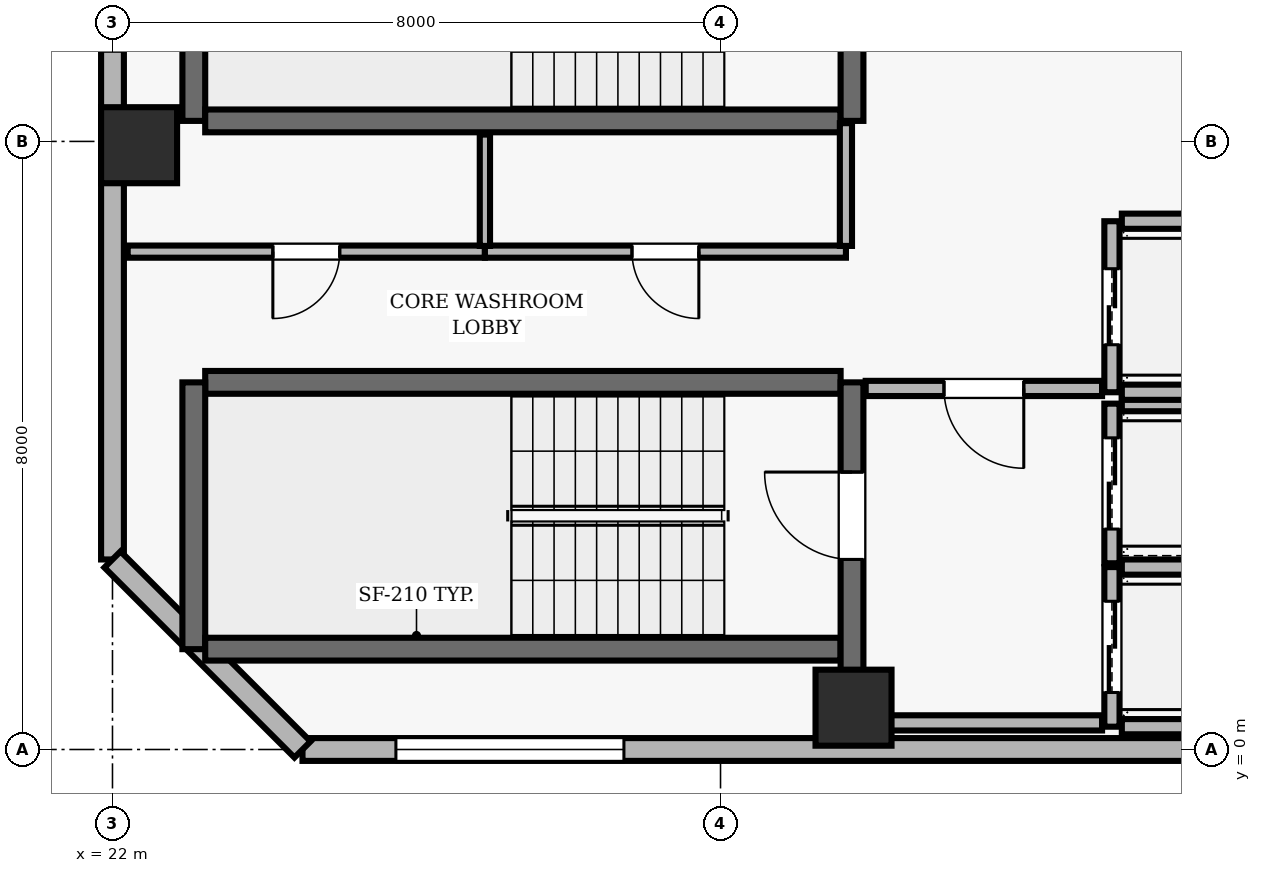
"""IFC4 building model, lengths in metres.
Left out: names, types, materials, properties, quantities, classifications, styles, units other than length and angle.
Written with IfcOpenShell. Run it as: python <this file> out.ifc"""

import sys

from ifc_helpers import new_model, si_unit, direction, frame, frame_2d, origin, origin_2d, place, context, subcontext, project, spatial, rectangle, extrude, element, fill, save


model = new_model("IFC4")
c1 = context("Model", 3, precision=1e-05, world=origin(), true_north=direction((0.0, 1.0)))
c2 = subcontext(c1, "Body", "Model", "MODEL_VIEW")
j1 = project(units=[si_unit("LENGTHUNIT", "METRE"), si_unit("PLANEANGLEUNIT", "RADIAN")], contexts=[c1])
p1 = place(None, origin())
s1 = spatial("IfcSite", under=j1, at=p1, CompositionType="ELEMENT")
p2 = place(p1, origin())
s2 = spatial("IfcBuilding", under=s1, at=p2, CompositionType="ELEMENT")
p3 = place(p2, frame((0.0, 0.0, 195.3)))
s3 = spatial("IfcBuildingStorey", under=s2, at=p3, CompositionType="ELEMENT", Elevation=195.3)
for number, where, z_axis, x_axis in (
    (1, (31.75, 0.55, 0.0), (0.0, 0.0, 1.0), (1.0, 0.0, 0.0)),
    (2, (22.35, 7.95, 0.0), (0.0, 0.0, 1.0), (1.0, 0.0, 0.0)),
):
    element("IfcColumn", number, at=place(p3, frame(where, z_axis=z_axis, x_axis=x_axis)), inside=s3, PredefinedType="COLUMN", context=c2, shape_type="SweptSolid", body=[
        extrude(rectangle(XDim=1.0, YDim=1.0, at=origin_2d()), origin(), (0.0, 0.0, 1.0), 3.9),
    ])
p4 = place(p3, frame((24.5, 0.0, 0.0), z_axis=(0.0, 0.0, 1.0), x_axis=(1.0, 0.0, 0.0)))
e3 = element("IfcWall", 3, at=p4, inside=s3, PredefinedType="SOLIDWALL", context=c2, shape_type="SweptSolid", body=[
    extrude(rectangle(XDim=38.2, YDim=0.3, at=frame_2d((19.1, 0.0))), origin(), (0.0, 0.0, 1.0), 3.69),
])
p5 = place(p4, frame((1.229, 0.0, 0.9)))
e4 = element("IfcOpeningElement", 4, at=p5, cuts=e3, PredefinedType="OPENING", context=c2, shape_type="SweptSolid", body=[
    extrude(rectangle(XDim=3.0, YDim=2.2, at=frame_2d((1.5, 1.1))), frame((0.0, 0.16, 0.0), z_axis=(0.0, -1.0, 0.0), x_axis=(1.0, 0.0, 0.0)), (0.0, 0.0, 1.0), 0.32),
])
p6 = place(p4, frame((17.6, 0.0, 0.9)))
e5 = element("IfcOpeningElement", 5, at=p6, cuts=e3, PredefinedType="OPENING", context=c2, shape_type="SweptSolid", body=[
    extrude(rectangle(XDim=3.0, YDim=2.2, at=frame_2d((1.5, 1.1))), frame((0.0, 0.16, 0.0), z_axis=(0.0, -1.0, 0.0), x_axis=(1.0, 0.0, 0.0)), (0.0, 0.0, 1.0), 0.32),
])
p7 = place(p4, frame((23.057, 0.0, 0.9)))
e6 = element("IfcOpeningElement", 6, at=p7, cuts=e3, PredefinedType="OPENING", context=c2, shape_type="SweptSolid", body=[
    extrude(rectangle(XDim=3.0, YDim=2.2, at=frame_2d((1.5, 1.1))), frame((0.0, 0.16, 0.0), z_axis=(0.0, -1.0, 0.0), x_axis=(1.0, 0.0, 0.0)), (0.0, 0.0, 1.0), 0.32),
])
p8 = place(p4, frame((29.414, 0.0, 0.9)))
e7 = element("IfcOpeningElement", 7, at=p8, cuts=e3, PredefinedType="OPENING", context=c2, shape_type="SweptSolid", body=[
    extrude(rectangle(XDim=3.0, YDim=2.2, at=frame_2d((1.5, 1.1))), frame((0.0, 0.16, 0.0), z_axis=(0.0, -1.0, 0.0), x_axis=(1.0, 0.0, 0.0)), (0.0, 0.0, 1.0), 0.32),
])
p9 = place(p3, frame((22.0, 40.7, 0.0), z_axis=(0.0, 0.0, 1.0), x_axis=(0.0, -1.0, 0.0)))
e8 = element("IfcWall", 8, at=p9, inside=s3, PredefinedType="SOLIDWALL", context=c2, shape_type="SweptSolid", body=[
    extrude(rectangle(XDim=38.2, YDim=0.3, at=frame_2d((19.1, 0.0))), origin(), (0.0, 0.0, 1.0), 3.69),
])
p10 = place(p9, frame((7.8, 0.0, 0.0)))
e9 = element("IfcOpeningElement", 9, at=p10, cuts=e8, PredefinedType="OPENING", context=c2, shape_type="SweptSolid", body=[
    extrude(rectangle(XDim=1.0, YDim=2.2, at=frame_2d((0.5, 1.1))), frame((0.0, 0.16, 0.0), z_axis=(0.0, -1.0, 0.0), x_axis=(1.0, 0.0, 0.0)), (0.0, 0.0, 1.0), 0.32),
])
p11 = place(p9, frame((1.229, 0.0, 0.9)))
e10 = element("IfcOpeningElement", 10, at=p11, cuts=e8, PredefinedType="OPENING", context=c2, shape_type="SweptSolid", body=[
    extrude(rectangle(XDim=3.0, YDim=2.2, at=frame_2d((1.5, 1.1))), frame((0.0, 0.16, 0.0), z_axis=(0.0, -1.0, 0.0), x_axis=(1.0, 0.0, 0.0)), (0.0, 0.0, 1.0), 0.32),
])
p12 = place(p9, frame((18.05, 0.0, 0.9)))
e11 = element("IfcOpeningElement", 11, at=p12, cuts=e8, PredefinedType="OPENING", context=c2, shape_type="SweptSolid", body=[
    extrude(rectangle(XDim=3.0, YDim=2.2, at=frame_2d((1.5, 1.1))), frame((0.0, 0.16, 0.0), z_axis=(0.0, -1.0, 0.0), x_axis=(1.0, 0.0, 0.0)), (0.0, 0.0, 1.0), 0.32),
])
p13 = place(p9, frame((28.514, 0.0, 0.9)))
e12 = element("IfcOpeningElement", 12, at=p13, cuts=e8, PredefinedType="OPENING", context=c2, shape_type="SweptSolid", body=[
    extrude(rectangle(XDim=3.0, YDim=2.2, at=frame_2d((1.5, 1.1))), frame((0.0, 0.16, 0.0), z_axis=(0.0, -1.0, 0.0), x_axis=(1.0, 0.0, 0.0)), (0.0, 0.0, 1.0), 0.32),
])
p14 = place(p3, frame((22.0, 2.5, 0.0), z_axis=(0.0, 0.0, 1.0), x_axis=(0.707106781187, -0.707106781187, 0.0)))
e13 = element("IfcWall", 13, at=p14, inside=s3, PredefinedType="SOLIDWALL", context=c2, shape_type="SweptSolid", body=[
    extrude(rectangle(XDim=3.536, YDim=0.3, at=frame_2d((1.768, 0.0))), origin(), (0.0, 0.0, 1.0), 3.69),
])
p15 = place(p3, frame((31.58, 4.83, 0.0), z_axis=(0.0, 0.0, 1.0), x_axis=(-1.0, 0.0, 0.0)))
e14 = element("IfcWall", 14, at=p15, inside=s3, PredefinedType="SHEAR", context=c2, shape_type="SweptSolid", body=[
    extrude(rectangle(XDim=8.36, YDim=0.3, at=frame_2d((4.18, 0.0))), origin(), (0.0, 0.0, 1.0), 3.69),
])
p16 = place(p3, frame((23.07, 4.83, 0.0), z_axis=(0.0, 0.0, 1.0), x_axis=(0.0, -1.0, 0.0)))
e15 = element("IfcWall", 15, at=p16, inside=s3, PredefinedType="SHEAR", context=c2, shape_type="SweptSolid", body=[
    extrude(rectangle(XDim=3.51, YDim=0.3, at=frame_2d((1.755, 0.0))), origin(), (0.0, 0.0, 1.0), 3.69),
])
p17 = place(p3, frame((23.22, 1.32, 0.0), z_axis=(0.0, 0.0, 1.0), x_axis=(1.0, 0.0, 0.0)))
e16 = element("IfcWall", 16, at=p17, inside=s3, PredefinedType="SHEAR", context=c2, shape_type="SweptSolid", body=[
    extrude(rectangle(XDim=8.36, YDim=0.3, at=frame_2d((4.18, 0.0))), origin(), (0.0, 0.0, 1.0), 3.69),
])
p18 = place(p3, frame((31.73, 0.96, 0.0), z_axis=(0.0, 0.0, 1.0), x_axis=(0.0, 1.0, 0.0)))
e17 = element("IfcWall", 17, at=p18, inside=s3, PredefinedType="SHEAR", context=c2, shape_type="SweptSolid", body=[
    extrude(rectangle(XDim=3.87, YDim=0.3, at=frame_2d((1.935, 0.0))), origin(), (0.0, 0.0, 1.0), 3.69),
])
p19 = place(p18, frame((1.54, 0.0, 0.0)))
e18 = element("IfcOpeningElement", 18, at=p19, cuts=e17, PredefinedType="OPENING", context=c2, shape_type="SweptSolid", body=[
    extrude(rectangle(XDim=1.15, YDim=2.15, at=frame_2d((0.575, 1.075))), frame((0.0, 0.16, 0.0), z_axis=(0.0, -1.0, 0.0), x_axis=(1.0, 0.0, 0.0)), (0.0, 0.0, 1.0), 0.32),
])
p20 = place(p3, frame((23.07, 11.78, 0.0), z_axis=(0.0, 0.0, 1.0), x_axis=(0.0, -1.0, 0.0)))
e19 = element("IfcWall", 19, at=p20, inside=s3, PredefinedType="SHEAR", context=c2, shape_type="SweptSolid", body=[
    extrude(rectangle(XDim=3.51, YDim=0.3, at=frame_2d((1.755, 0.0))), origin(), (0.0, 0.0, 1.0), 3.69),
])
p21 = place(p3, frame((23.22, 8.27, 0.0), z_axis=(0.0, 0.0, 1.0), x_axis=(1.0, 0.0, 0.0)))
e20 = element("IfcWall", 20, at=p21, inside=s3, PredefinedType="SHEAR", context=c2, shape_type="SweptSolid", body=[
    extrude(rectangle(XDim=8.36, YDim=0.3, at=frame_2d((4.18, 0.0))), origin(), (0.0, 0.0, 1.0), 3.69),
])
p22 = place(p3, frame((31.73, 8.27, 0.0), z_axis=(0.0, 0.0, 1.0), x_axis=(0.0, 1.0, 0.0)))
e21 = element("IfcWall", 21, at=p22, inside=s3, PredefinedType="SHEAR", context=c2, shape_type="SweptSolid", body=[
    extrude(rectangle(XDim=3.51, YDim=0.3, at=frame_2d((1.755, 0.0))), origin(), (0.0, 0.0, 1.0), 3.69),
])
p23 = place(p22, frame((1.18, 0.0, 0.0)))
e22 = element("IfcOpeningElement", 22, at=p23, cuts=e21, PredefinedType="OPENING", context=c2, shape_type="SweptSolid", body=[
    extrude(rectangle(XDim=1.15, YDim=2.15, at=frame_2d((0.575, 1.075))), frame((0.0, 0.16, 0.0), z_axis=(0.0, -1.0, 0.0), x_axis=(1.0, 0.0, 0.0)), (0.0, 0.0, 1.0), 0.32),
])
p24 = place(p3, frame((35.15, 2.4, 0.0), z_axis=(0.0, 0.0, 1.0), x_axis=(0.0, -1.0, 0.0)))
e23 = element("IfcWall", 23, at=p24, inside=s3, PredefinedType="SOLIDWALL", context=c2, shape_type="SweptSolid", body=[
    extrude(rectangle(XDim=2.1, YDim=0.2, at=frame_2d((1.05, 0.0))), origin(), (0.0, 0.0, 1.0), 3.69),
])
p25 = place(p24, frame((0.45, 0.0, 0.0)))
e24 = element("IfcOpeningElement", 24, at=p25, cuts=e23, PredefinedType="OPENING", context=c2, shape_type="SweptSolid", body=[
    extrude(rectangle(XDim=1.2, YDim=2.15, at=frame_2d((0.6, 1.075))), frame((0.0, 0.11, 0.0), z_axis=(0.0, -1.0, 0.0), x_axis=(1.0, 0.0, 0.0)), (0.0, 0.0, 1.0), 0.22),
])
for number, where, z_axis, x_axis in (
    (25, (35.28, 0.3, 0.0), (0.0, 0.0, 1.0), (1.0, 0.0, 0.0)),
    (26, (37.42, 2.4, 0.0), (0.0, 0.0, 1.0), (-1.0, 0.0, 0.0)),
):
    element("IfcWall", number, at=place(p3, frame(where, z_axis=z_axis, x_axis=x_axis)), inside=s3, PredefinedType="SOLIDWALL", context=c2, shape_type="SweptSolid", body=[
        extrude(rectangle(XDim=2.14, YDim=0.2, at=frame_2d((1.07, 0.0))), origin(), (0.0, 0.0, 1.0), 3.69),
    ])
p26 = place(p3, frame((35.15, 4.55, 0.0), z_axis=(0.0, 0.0, 1.0), x_axis=(0.0, -1.0, 0.0)))
e27 = element("IfcWall", 27, at=p26, inside=s3, PredefinedType="SOLIDWALL", context=c2, shape_type="SweptSolid", body=[
    extrude(rectangle(XDim=2.1, YDim=0.2, at=frame_2d((1.05, 0.0))), origin(), (0.0, 0.0, 1.0), 3.69),
])
p27 = place(p26, frame((0.45, 0.0, 0.0)))
e28 = element("IfcOpeningElement", 28, at=p27, cuts=e27, PredefinedType="OPENING", context=c2, shape_type="SweptSolid", body=[
    extrude(rectangle(XDim=1.2, YDim=2.15, at=frame_2d((0.6, 1.075))), frame((0.0, 0.11, 0.0), z_axis=(0.0, -1.0, 0.0), x_axis=(1.0, 0.0, 0.0)), (0.0, 0.0, 1.0), 0.22),
])
p28 = place(p3, frame((37.42, 4.55, 0.0), z_axis=(0.0, 0.0, 1.0), x_axis=(-1.0, 0.0, 0.0)))
e29 = element("IfcWall", 29, at=p28, inside=s3, PredefinedType="SOLIDWALL", context=c2, shape_type="SweptSolid", body=[
    extrude(rectangle(XDim=2.14, YDim=0.2, at=frame_2d((1.07, 0.0))), origin(), (0.0, 0.0, 1.0), 3.69),
])
p29 = place(p3, frame((35.15, 6.95, 0.0), z_axis=(0.0, 0.0, 1.0), x_axis=(0.0, -1.0, 0.0)))
e30 = element("IfcWall", 30, at=p29, inside=s3, PredefinedType="SOLIDWALL", context=c2, shape_type="SweptSolid", body=[
    extrude(rectangle(XDim=2.25, YDim=0.2, at=frame_2d((1.125, 0.0))), origin(), (0.0, 0.0, 1.0), 3.69),
])
p30 = place(p29, frame((0.625, 0.0, 0.0)))
e31 = element("IfcOpeningElement", 31, at=p30, cuts=e30, PredefinedType="OPENING", context=c2, shape_type="SweptSolid", body=[
    extrude(rectangle(XDim=1.0, YDim=2.1, at=frame_2d((0.5, 1.05))), frame((0.0, 0.11, 0.0), z_axis=(0.0, -1.0, 0.0), x_axis=(1.0, 0.0, 0.0)), (0.0, 0.0, 1.0), 0.22),
])
for number, where, z_axis, x_axis in (
    (32, (35.28, 4.7, 0.0), (0.0, 0.0, 1.0), (1.0, 0.0, 0.0)),
    (33, (37.42, 6.95, 0.0), (0.0, 0.0, 1.0), (-1.0, 0.0, 0.0)),
):
    element("IfcWall", number, at=place(p3, frame(where, z_axis=z_axis, x_axis=x_axis)), inside=s3, PredefinedType="SOLIDWALL", context=c2, shape_type="SweptSolid", body=[
        extrude(rectangle(XDim=2.14, YDim=0.2, at=frame_2d((1.07, 0.0))), origin(), (0.0, 0.0, 1.0), 3.69),
    ])
p31 = place(p3, frame((26.9, 6.55, 0.0), z_axis=(0.0, 0.0, 1.0), x_axis=(-1.0, 0.0, 0.0)))
e34 = element("IfcWall", 34, at=p31, inside=s3, PredefinedType="PARTITIONING", context=c2, shape_type="SweptSolid", body=[
    extrude(rectangle(XDim=4.7, YDim=0.16, at=frame_2d((2.35, 0.0))), origin(), (0.0, 0.0, 1.0), 3.69),
])
p32 = place(p31, frame((1.91, 0.0, 0.0)))
e35 = element("IfcOpeningElement", 35, at=p32, cuts=e34, PredefinedType="OPENING", context=c2, shape_type="SweptSolid", body=[
    extrude(rectangle(XDim=0.88, YDim=2.1, at=frame_2d((0.44, 1.05))), frame((0.0, 0.09, 0.0), z_axis=(0.0, -1.0, 0.0), x_axis=(1.0, 0.0, 0.0)), (0.0, 0.0, 1.0), 0.18),
])
p33 = place(p3, frame((31.65, 0.35, 0.0), z_axis=(0.0, 0.0, 1.0), x_axis=(1.0, 0.0, 0.0)))
e36 = element("IfcWall", 36, at=p33, inside=s3, PredefinedType="SOLIDWALL", context=c2, shape_type="SweptSolid", body=[
    extrude(rectangle(XDim=3.37, YDim=0.2, at=frame_2d((1.685, 0.0))), origin(), (0.0, 0.0, 1.0), 3.69),
])
p34 = place(p3, frame((31.65, 6.55, 0.0), z_axis=(0.0, 0.0, 1.0), x_axis=(-1.0, 0.0, 0.0)))
e37 = element("IfcWall", 37, at=p34, inside=s3, PredefinedType="PARTITIONING", context=c2, shape_type="SweptSolid", body=[
    extrude(rectangle(XDim=4.75, YDim=0.16, at=frame_2d((2.375, 0.0))), origin(), (0.0, 0.0, 1.0), 3.69),
])
p35 = place(p34, frame((1.935, 0.0, 0.0)))
e38 = element("IfcOpeningElement", 38, at=p35, cuts=e37, PredefinedType="OPENING", context=c2, shape_type="SweptSolid", body=[
    extrude(rectangle(XDim=0.88, YDim=2.1, at=frame_2d((0.44, 1.05))), frame((0.0, 0.09, 0.0), z_axis=(0.0, -1.0, 0.0), x_axis=(1.0, 0.0, 0.0)), (0.0, 0.0, 1.0), 0.18),
])
p36 = place(p3, frame((35.02, 4.75, 0.0), z_axis=(0.0, 0.0, 1.0), x_axis=(-1.0, 0.0, 0.0)))
e39 = element("IfcWall", 39, at=p36, inside=s3, PredefinedType="SOLIDWALL", context=c2, shape_type="SweptSolid", body=[
    extrude(rectangle(XDim=3.11, YDim=0.2, at=frame_2d((1.555, 0.0))), origin(), (0.0, 0.0, 1.0), 3.69),
])
p37 = place(p36, frame((1.03, 0.0, 0.0)))
e40 = element("IfcOpeningElement", 40, at=p37, cuts=e39, PredefinedType="OPENING", context=c2, shape_type="SweptSolid", body=[
    extrude(rectangle(XDim=1.05, YDim=2.15, at=frame_2d((0.525, 1.075))), frame((0.0, 0.11, 0.0), z_axis=(0.0, -1.0, 0.0), x_axis=(1.0, 0.0, 0.0)), (0.0, 0.0, 1.0), 0.22),
])
p38 = place(p3, frame((26.9, 6.625, 0.0), z_axis=(0.0, 0.0, 1.0), x_axis=(0.0, 1.0, 0.0)))
e41 = element("IfcWall", 41, at=p38, inside=s3, PredefinedType="PARTITIONING", context=c2, shape_type="SweptSolid", body=[
    extrude(rectangle(XDim=1.465, YDim=0.135, at=frame_2d((0.732, 0.0))), origin(), (0.0, 0.0, 1.0), 3.69),
])
p39 = place(p3, frame((31.65, 8.24, 0.0), z_axis=(0.0, 0.0, 1.0), x_axis=(0.0, -1.0, 0.0)))
e42 = element("IfcWall", 42, at=p39, inside=s3, PredefinedType="PARTITIONING", context=c2, shape_type="SweptSolid", body=[
    extrude(rectangle(XDim=1.615, YDim=0.16, at=frame_2d((0.808, 0.0))), origin(), (0.0, 0.0, 1.0), 3.69),
])
p40 = place(p5, origin())
e43 = element("IfcWindow", 43, at=p40, inside=s3, PartitioningType="SINGLE_PANEL", PredefinedType="WINDOW", context=c2, shape_type="SweptSolid", body=[
    extrude(rectangle(XDim=3.0, YDim=2.2, at=frame_2d((1.5, 1.1))), frame((0.0, 0.03, 0.0), z_axis=(0.0, -1.0, 0.0), x_axis=(1.0, 0.0, 0.0)), (0.0, 0.0, 1.0), 0.06),
])
fill(e4, e43)
p41 = place(p19, origin())
e44 = element("IfcDoor", 44, at=p41, inside=s3, OperationType="SINGLE_SWING_RIGHT", PredefinedType="DOOR", context=c2, shape_type="SweptSolid", body=[
    extrude(rectangle(XDim=1.15, YDim=2.15, at=frame_2d((0.575, 1.075))), frame((0.0, 0.025, 0.0), z_axis=(0.0, -1.0, 0.0), x_axis=(1.0, 0.0, 0.0)), (0.0, 0.0, 1.0), 0.05),
])
fill(e18, e44)
p42 = place(p25, origin())
e45 = element("IfcDoor", 45, at=p42, inside=s3, OperationType="DOUBLE_DOOR_SLIDING", PredefinedType="DOOR", context=c2, shape_type="SweptSolid", body=[
    extrude(rectangle(XDim=1.2, YDim=2.15, at=frame_2d((0.6, 1.075))), frame((0.0, 0.025, 0.0), z_axis=(0.0, -1.0, 0.0), x_axis=(1.0, 0.0, 0.0)), (0.0, 0.0, 1.0), 0.05),
])
fill(e24, e45)
p43 = place(p27, origin())
e46 = element("IfcDoor", 46, at=p43, inside=s3, OperationType="DOUBLE_DOOR_SLIDING", PredefinedType="DOOR", context=c2, shape_type="SweptSolid", body=[
    extrude(rectangle(XDim=1.2, YDim=2.15, at=frame_2d((0.6, 1.075))), frame((0.0, 0.025, 0.0), z_axis=(0.0, -1.0, 0.0), x_axis=(1.0, 0.0, 0.0)), (0.0, 0.0, 1.0), 0.05),
])
fill(e28, e46)
p44 = place(p30, origin())
e47 = element("IfcDoor", 47, at=p44, inside=s3, OperationType="DOUBLE_DOOR_SLIDING", PredefinedType="DOOR", context=c2, shape_type="SweptSolid", body=[
    extrude(rectangle(XDim=1.0, YDim=2.1, at=frame_2d((0.5, 1.05))), frame((0.0, 0.025, 0.0), z_axis=(0.0, -1.0, 0.0), x_axis=(1.0, 0.0, 0.0)), (0.0, 0.0, 1.0), 0.05),
])
fill(e31, e47)
p45 = place(p37, origin())
e48 = element("IfcDoor", 48, at=p45, inside=s3, OperationType="SINGLE_SWING_LEFT", PredefinedType="DOOR", context=c2, shape_type="SweptSolid", body=[
    extrude(rectangle(XDim=1.05, YDim=2.15, at=frame_2d((0.525, 1.075))), frame((0.0, 0.025, 0.0), z_axis=(0.0, -1.0, 0.0), x_axis=(1.0, 0.0, 0.0)), (0.0, 0.0, 1.0), 0.05),
])
fill(e40, e48)
p46 = place(p32, origin())
e49 = element("IfcDoor", 49, at=p46, inside=s3, OperationType="SINGLE_SWING_RIGHT", PredefinedType="DOOR", context=c2, shape_type="SweptSolid", body=[
    extrude(rectangle(XDim=0.88, YDim=2.1, at=frame_2d((0.44, 1.05))), frame((0.0, 0.025, 0.0), z_axis=(0.0, -1.0, 0.0), x_axis=(1.0, 0.0, 0.0)), (0.0, 0.0, 1.0), 0.05),
])
fill(e35, e49)
p47 = place(p35, origin())
e50 = element("IfcDoor", 50, at=p47, inside=s3, OperationType="SINGLE_SWING_LEFT", PredefinedType="DOOR", context=c2, shape_type="SweptSolid", body=[
    extrude(rectangle(XDim=0.88, YDim=2.1, at=frame_2d((0.44, 1.05))), frame((0.0, 0.025, 0.0), z_axis=(0.0, -1.0, 0.0), x_axis=(1.0, 0.0, 0.0)), (0.0, 0.0, 1.0), 0.05),
])
fill(e38, e50)
save(model, sys.argv[1])
